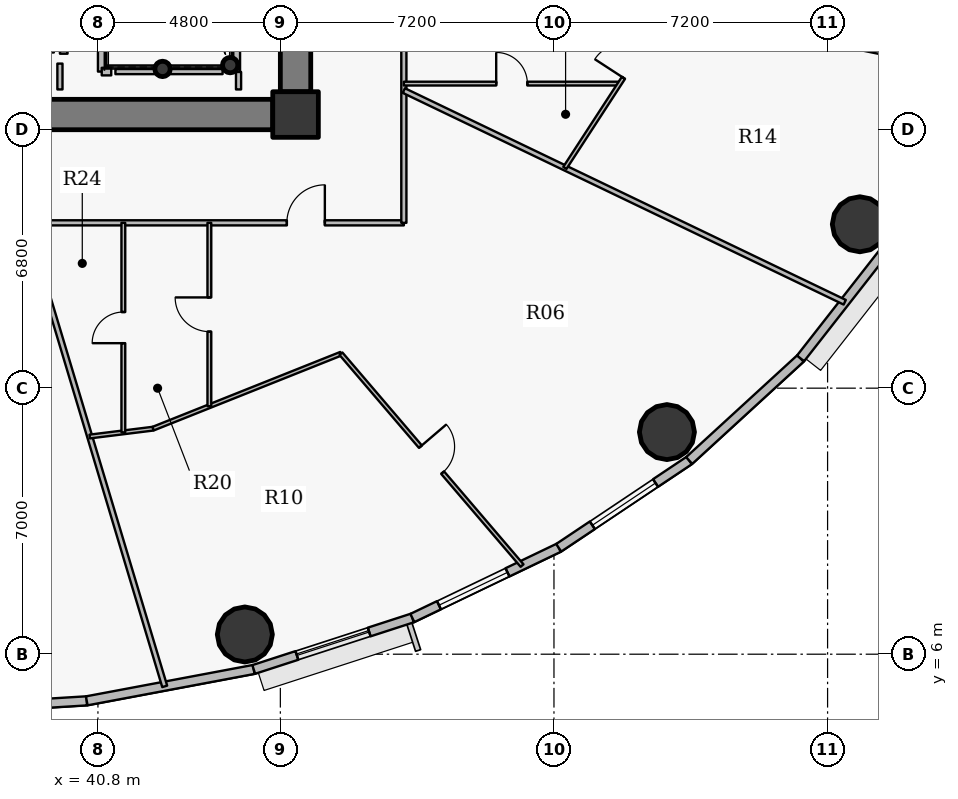
"""IFC4 building model, lengths in metres.
Left out: names, types, materials, properties, quantities, classifications, styles, units other than length and angle.
Written with IfcOpenShell. Run it as: python <this file> out.ifc"""

import sys

from ifc_helpers import new_model, si_unit, direction, frame, frame_2d, origin, origin_2d, place, context, subcontext, project, spatial, rectangle, hollow_circle, extrude, source, transform, mapped, element, fill, save


model = new_model("IFC4")
c1 = context("Model", 3, precision=1e-05, world=origin(), true_north=direction((0.0, 1.0)))
c2 = subcontext(c1, "Body", "Model", "MODEL_VIEW")
j1 = project(units=[si_unit("LENGTHUNIT", "METRE"), si_unit("PLANEANGLEUNIT", "RADIAN")], contexts=[c1])
p1 = place(None, origin())
s1 = spatial("IfcSite", under=j1, at=p1, CompositionType="ELEMENT")
p2 = place(p1, origin())
s2 = spatial("IfcBuilding", under=s1, at=p2, CompositionType="ELEMENT")
p3 = place(p2, frame((0.0, 0.0, 104.7)))
s3 = spatial("IfcBuildingStorey", under=s2, at=p3, CompositionType="ELEMENT", Elevation=104.7)
p4 = place(p3, frame((46.0, 20.2, 0.0), z_axis=(0.0, 0.0, 1.0), x_axis=(1.0, 0.0, 0.0)))
e1 = element("IfcColumn", 1, at=p4, inside=s3, PredefinedType="COLUMN", context=c2, shape_type="SweptSolid", body=[
    extrude(rectangle(XDim=1.2, YDim=1.2, at=origin_2d()), origin(), (0.0, 0.0, 1.0), 3.75),
])
for number, where, z_axis, x_axis in (
    (2, (44.28, 21.5, 0.0), (0.0, 0.0, 1.0), (1.0, 0.0, 0.0)),
    (3, (42.5, 21.4, 0.0), (0.0, 0.0, 1.0), (1.0, 0.0, 0.0)),
):
    element("IfcColumn", number, at=place(p3, frame(where, z_axis=z_axis, x_axis=x_axis)), inside=s3, PredefinedType="COLUMN", context=c2, shape_type="SweptSolid", body=[
        extrude(hollow_circle(Radius=0.203, WallThickness=0.016, at=origin_2d()), origin(), (0.0, 0.0, 1.0), 3.75),
    ])
p5 = place(p3, frame((46.0, 33.2, 0.0), z_axis=(0.0, 0.0, 1.0), x_axis=(0.0, -1.0, 0.0)))
e4 = element("IfcWall", 4, at=p5, inside=s3, PredefinedType="SHEAR", context=c2, shape_type="SweptSolid", body=[
    extrude(rectangle(XDim=12.4, YDim=0.8, at=frame_2d((6.2, 0.0))), origin(), (0.0, 0.0, 1.0), 2.95),
])
p6 = place(p5, frame((5.79, 0.0, 0.0)))
e5 = element("IfcOpeningElement", 5, at=p6, cuts=e4, PredefinedType="OPENING", context=c2, shape_type="SweptSolid", body=[
    extrude(rectangle(XDim=0.82, YDim=2.1, at=origin_2d()), frame((0.41, 0.41, 1.05), z_axis=(0.0, -1.0, 0.0), x_axis=(1.0, 0.0, 0.0)), (0.0, 0.0, 1.0), 0.82),
])
p7 = place(p3, frame((45.4, 20.2, 0.0), z_axis=(0.0, 0.0, 1.0), x_axis=(-1.0, 0.0, 0.0)))
e6 = element("IfcWall", 6, at=p7, inside=s3, PredefinedType="SHEAR", context=c2, shape_type="SweptSolid", body=[
    extrude(rectangle(XDim=18.8, YDim=0.8, at=frame_2d((9.4, 0.0))), origin(), (0.0, 0.0, 1.0), 2.95),
])
p8 = place(p7, frame((10.15, 0.0, 0.0)))
e7 = element("IfcOpeningElement", 7, at=p8, cuts=e6, PredefinedType="OPENING", context=c2, shape_type="SweptSolid", body=[
    extrude(rectangle(XDim=1.15, YDim=2.15, at=origin_2d()), frame((0.575, 0.41, 1.075), z_axis=(0.0, -1.0, 0.0), x_axis=(1.0, 0.0, 0.0)), (0.0, 0.0, 1.0), 0.82),
])
for number, where, z_axis, x_axis in (
    (8, (44.666, 6.519, 0.0), (0.0, 0.0, 1.0), (1.0, 0.0, 0.0)),
    (9, (55.773, 11.844, 0.0), (0.0, 0.0, 1.0), (1.0, 0.0, 0.0)),
    (10, (60.849, 17.312, 0.0), (0.0, 0.0, 1.0), (1.0, 0.0, 0.0)),
):
    element("IfcColumn", number, at=place(p3, frame(where, z_axis=z_axis, x_axis=x_axis)), inside=s3, PredefinedType="COLUMN", context=c2, shape_type="SweptSolid", body=[
        extrude(hollow_circle(Radius=0.725, WallThickness=0.042, at=origin_2d()), origin(), (0.0, 0.0, 1.0), 3.75),
    ])
p9 = place(p3, frame((40.506, 4.773, 0.0), z_axis=(0.0, 0.0, 1.0), x_axis=(-0.998107531589, -0.061492726276, 0.0)))
e11 = element("IfcWall", 11, at=p9, inside=s3, PredefinedType="SOLIDWALL", context=c2, shape_type="SweptSolid", body=[
    extrude(rectangle(XDim=4.514, YDim=0.24, at=frame_2d((2.257, 0.0))), origin(), (0.0, 0.0, 1.0), 3.5),
])
p10 = place(p9, frame((1.257, 0.0, 0.9)))
e12 = element("IfcOpeningElement", 12, at=p10, cuts=e11, PredefinedType="OPENING", context=c2, shape_type="SweptSolid", body=[
    extrude(rectangle(XDim=2.0, YDim=1.75, at=origin_2d()), frame((1.0, 0.13, 0.875), z_axis=(0.0, -1.0, 0.0), x_axis=(1.0, 0.0, 0.0)), (0.0, 0.0, 1.0), 0.26),
])
p11 = place(p3, frame((44.9, 5.599, 0.0), z_axis=(0.0, 0.0, 1.0), x_axis=(-0.982789252177, -0.184730305596, 0.0)))
e13 = element("IfcWall", 13, at=p11, inside=s3, PredefinedType="SOLIDWALL", context=c2, shape_type="SweptSolid", body=[
    extrude(rectangle(XDim=4.471, YDim=0.24, at=frame_2d((2.235, 0.0))), origin(), (0.0, 0.0, 1.0), 3.5),
])
p12 = place(p3, frame((49.074, 6.953, 0.0), z_axis=(0.0, 0.0, 1.0), x_axis=(-0.951211346073, -0.308540070495, 0.0)))
e14 = element("IfcWall", 14, at=p12, inside=s3, PredefinedType="SOLIDWALL", context=c2, shape_type="SweptSolid", body=[
    extrude(rectangle(XDim=4.388, YDim=0.24, at=frame_2d((2.194, 0.0))), origin(), (0.0, 0.0, 1.0), 3.5),
])
p13 = place(p12, frame((1.194, 0.0, 0.9)))
e15 = element("IfcOpeningElement", 15, at=p13, cuts=e14, PredefinedType="OPENING", context=c2, shape_type="SweptSolid", body=[
    extrude(rectangle(XDim=2.0, YDim=1.75, at=origin_2d()), frame((1.0, 0.13, 0.875), z_axis=(0.0, -1.0, 0.0), x_axis=(1.0, 0.0, 0.0)), (0.0, 0.0, 1.0), 0.26),
])
p14 = place(p3, frame((52.925, 8.801, 0.0), z_axis=(0.0, 0.0, 1.0), x_axis=(-0.901589935876, -0.432591709962, 0.0)))
e16 = element("IfcWall", 16, at=p14, inside=s3, PredefinedType="SOLIDWALL", context=c2, shape_type="SweptSolid", body=[
    extrude(rectangle(XDim=4.272, YDim=0.24, at=frame_2d((2.136, 0.0))), origin(), (0.0, 0.0, 1.0), 3.5),
])
p15 = place(p14, frame((1.495, 0.0, 0.9)))
e17 = element("IfcOpeningElement", 17, at=p15, cuts=e16, PredefinedType="OPENING", context=c2, shape_type="SweptSolid", body=[
    extrude(rectangle(XDim=2.0, YDim=1.75, at=origin_2d()), frame((1.0, 0.13, 0.875), z_axis=(0.0, -1.0, 0.0), x_axis=(1.0, 0.0, 0.0)), (0.0, 0.0, 1.0), 0.26),
])
p16 = place(p3, frame((56.358, 11.097, 0.0), z_axis=(0.0, 0.0, 1.0), x_axis=(-0.831221811447, -0.555940914284, 0.0)))
e18 = element("IfcWall", 18, at=p16, inside=s3, PredefinedType="SOLIDWALL", context=c2, shape_type="SweptSolid", body=[
    extrude(rectangle(XDim=4.13, YDim=0.24, at=frame_2d((2.065, 0.0))), origin(), (0.0, 0.0, 1.0), 3.5),
])
p17 = place(p16, frame((1.065, 0.0, 0.9)))
e19 = element("IfcOpeningElement", 19, at=p17, cuts=e18, PredefinedType="OPENING", context=c2, shape_type="SweptSolid", body=[
    extrude(rectangle(XDim=2.0, YDim=1.75, at=origin_2d()), frame((1.0, 0.13, 0.875), z_axis=(0.0, -1.0, 0.0), x_axis=(1.0, 0.0, 0.0)), (0.0, 0.0, 1.0), 0.26),
])
p18 = place(p3, frame((59.289, 13.783, 0.0), z_axis=(0.0, 0.0, 1.0), x_axis=(-0.737113356241, -0.675769117414, 0.0)))
e20 = element("IfcWall", 20, at=p18, inside=s3, PredefinedType="SOLIDWALL", context=c2, shape_type="SweptSolid", body=[
    extrude(rectangle(XDim=3.976, YDim=0.24, at=frame_2d((1.988, 0.0))), origin(), (0.0, 0.0, 1.0), 3.5),
])
p19 = place(p3, frame((61.645, 16.794, 0.0), z_axis=(0.0, 0.0, 1.0), x_axis=(-0.616272103517, -0.787533297345, 0.0)))
e21 = element("IfcWall", 21, at=p19, inside=s3, PredefinedType="SOLIDWALL", context=c2, shape_type="SweptSolid", body=[
    extrude(rectangle(XDim=3.823, YDim=0.24, at=frame_2d((1.912, 0.0))), origin(), (0.0, 0.0, 1.0), 3.5),
])
p20 = place(p3, frame((34.795, 17.35, 0.0), z_axis=(0.0, 0.0, 1.0), x_axis=(1.0, 0.0, 0.0)))
e22 = element("IfcWall", 22, at=p20, inside=s3, PredefinedType="PARTITIONING", context=c2, shape_type="SweptSolid", body=[
    extrude(rectangle(XDim=14.055, YDim=0.135, at=frame_2d((7.028, 0.0))), origin(), (0.0, 0.0, 1.0), 2.935),
])
p21 = place(p20, frame((1.571, 0.0, 0.0)))
e23 = element("IfcOpeningElement", 23, at=p21, cuts=e22, PredefinedType="OPENING", context=c2, shape_type="SweptSolid", body=[
    extrude(rectangle(XDim=1.0, YDim=2.15, at=origin_2d()), frame((0.5, 0.078, 1.075), z_axis=(0.0, -1.0, 0.0), x_axis=(1.0, 0.0, 0.0)), (0.0, 0.0, 1.0), 0.155),
])
p22 = place(p20, frame((10.976, 0.0, 0.0)))
e24 = element("IfcOpeningElement", 24, at=p22, cuts=e22, PredefinedType="OPENING", context=c2, shape_type="SweptSolid", body=[
    extrude(rectangle(XDim=1.0, YDim=2.15, at=origin_2d()), frame((0.5, 0.078, 1.075), z_axis=(0.0, -1.0, 0.0), x_axis=(1.0, 0.0, 0.0)), (0.0, 0.0, 1.0), 0.155),
])
p23 = place(p3, frame((38.896, 17.35, 0.0), z_axis=(0.0, 0.0, 1.0), x_axis=(0.287463970392, -0.957791452105, 0.0)))
e25 = element("IfcWall", 25, at=p23, inside=s3, PredefinedType="PARTITIONING", context=c2, shape_type="SweptSolid", body=[
    extrude(rectangle(XDim=12.734, YDim=0.135, at=frame_2d((6.367, 0.0))), origin(), (0.0, 0.0, 1.0), 2.935),
])
p24 = place(p3, frame((39.8, 21.9, 0.0), z_axis=(0.0, 0.0, 1.0), x_axis=(1.0, 0.0, 0.0)))
e26 = element("IfcWall", 26, at=p24, inside=s3, PredefinedType="PARTITIONING", context=c2, shape_type="SweptSolid", body=[
    extrude(rectangle(XDim=0.2, YDim=0.2, at=frame_2d((0.1, 0.0))), origin(), (0.0, 0.0, 1.0), 3.5),
])
p25 = place(p3, frame((40.584, 11.728, 0.0), z_axis=(0.0, 0.0, 1.0), x_axis=(0.992400317705, 0.123051247123, 0.0)))
e27 = element("IfcWall", 27, at=p25, inside=s3, PredefinedType="PARTITIONING", context=c2, shape_type="SweptSolid", body=[
    extrude(rectangle(XDim=1.68, YDim=0.1, at=frame_2d((0.84, 0.0))), origin(), (0.0, 0.0, 1.0), 2.935),
])
p26 = place(p3, frame((40.9, 21.33, 0.0), z_axis=(0.0, 0.0, 1.0), x_axis=(0.0, 1.0, 0.0)))
e28 = element("IfcWall", 28, at=p26, inside=s3, PredefinedType="PARTITIONING", context=c2, shape_type="SweptSolid", body=[
    extrude(rectangle(XDim=5.91, YDim=0.2, at=frame_2d((2.955, 0.0))), origin(), (0.0, 0.0, 1.0), 3.035),
])
p27 = place(p3, frame((40.9, 21.33, 0.0), z_axis=(0.0, 0.0, 1.0), x_axis=(1.0, 0.0, 0.0)))
e29 = element("IfcWall", 29, at=p27, inside=s3, PredefinedType="PARTITIONING", context=c2, shape_type="SweptSolid", body=[
    extrude(rectangle(XDim=0.25, YDim=0.2, at=frame_2d((0.125, 0.0))), origin(), (0.0, 0.0, 1.0), 3.035),
])
p28 = place(p3, frame((41.469, 11.837, 0.0), z_axis=(0.0, 0.0, 1.0), x_axis=(0.0, 1.0, 0.0)))
e30 = element("IfcWall", 30, at=p28, inside=s3, PredefinedType="PARTITIONING", context=c2, shape_type="SweptSolid", body=[
    extrude(rectangle(XDim=5.513, YDim=0.1, at=frame_2d((2.756, 0.0))), origin(), (0.0, 0.0, 1.0), 2.935),
])
p29 = place(p28, frame((2.346, 0.0, 0.0)))
e31 = element("IfcOpeningElement", 31, at=p29, cuts=e30, PredefinedType="OPENING", context=c2, shape_type="SweptSolid", body=[
    extrude(rectangle(XDim=0.82, YDim=2.1, at=origin_2d()), frame((0.41, 0.06, 1.05), z_axis=(0.0, -1.0, 0.0), x_axis=(1.0, 0.0, 0.0)), (0.0, 0.0, 1.0), 0.12),
])
p30 = place(p3, frame((42.251, 11.934, 0.0), z_axis=(0.0, 0.0, 1.0), x_axis=(0.928805351872, 0.370567967226, 0.0)))
e32 = element("IfcWall", 32, at=p30, inside=s3, PredefinedType="PARTITIONING", context=c2, shape_type="SweptSolid", body=[
    extrude(rectangle(XDim=5.322, YDim=0.1, at=frame_2d((2.661, 0.0))), origin(), (0.0, 0.0, 1.0), 2.935),
])
p31 = place(p3, frame((43.732, 12.525, 0.0), z_axis=(0.0, 0.0, 1.0), x_axis=(0.0, 1.0, 0.0)))
e33 = element("IfcWall", 33, at=p31, inside=s3, PredefinedType="PARTITIONING", context=c2, shape_type="SweptSolid", body=[
    extrude(rectangle(XDim=4.825, YDim=0.1, at=frame_2d((2.413, 0.0))), origin(), (0.0, 0.0, 1.0), 3.5),
])
p32 = place(p31, frame((1.962, 0.0, 0.0)))
e34 = element("IfcOpeningElement", 34, at=p32, cuts=e33, PredefinedType="OPENING", context=c2, shape_type="SweptSolid", body=[
    extrude(rectangle(XDim=0.9, YDim=2.1, at=origin_2d()), frame((0.45, 0.06, 1.05), z_axis=(0.0, -1.0, 0.0), x_axis=(1.0, 0.0, 0.0)), (0.0, 0.0, 1.0), 0.12),
])
p33 = place(p3, frame((44.44, 21.33, 0.0), z_axis=(0.0, 0.0, 1.0), x_axis=(0.0, 1.0, 0.0)))
e35 = element("IfcWall", 35, at=p33, inside=s3, PredefinedType="PARTITIONING", context=c2, shape_type="SweptSolid", body=[
    extrude(rectangle(XDim=8.52, YDim=0.2, at=frame_2d((4.26, 0.0))), origin(), (0.0, 0.0, 1.0), 3.5),
])
p34 = place(p3, frame((47.195, 13.906, 0.0), z_axis=(0.0, 0.0, 1.0), x_axis=(0.649828611722, -0.76008076899, 0.0)))
e36 = element("IfcWall", 36, at=p34, inside=s3, PredefinedType="PARTITIONING", context=c2, shape_type="SweptSolid", body=[
    extrude(rectangle(XDim=7.334, YDim=0.1, at=frame_2d((3.667, 0.0))), origin(), (0.0, 0.0, 1.0), 2.935),
])
p35 = place(p34, frame((3.217, 0.0, 0.0)))
e37 = element("IfcOpeningElement", 37, at=p35, cuts=e36, PredefinedType="OPENING", context=c2, shape_type="SweptSolid", body=[
    extrude(rectangle(XDim=0.9, YDim=2.1, at=origin_2d()), frame((0.45, 0.06, 1.05), z_axis=(0.0, -1.0, 0.0), x_axis=(1.0, 0.0, 0.0)), (0.0, 0.0, 1.0), 0.12),
])
p36 = place(p3, frame((48.85, 17.35, 0.0), z_axis=(0.0, 0.0, 1.0), x_axis=(0.0, 1.0, 0.0)))
e38 = element("IfcWall", 38, at=p36, inside=s3, PredefinedType="PARTITIONING", context=c2, shape_type="SweptSolid", body=[
    extrude(rectangle(XDim=19.3, YDim=0.135, at=frame_2d((9.65, 0.0))), origin(), (0.0, 0.0, 1.0), 2.935),
])
p37 = place(p36, frame((16.551, 0.0, 0.0)))
e39 = element("IfcOpeningElement", 39, at=p37, cuts=e38, PredefinedType="OPENING", context=c2, shape_type="SweptSolid", body=[
    extrude(rectangle(XDim=1.0, YDim=2.15, at=origin_2d()), frame((0.5, 0.078, 1.075), z_axis=(0.0, -1.0, 0.0), x_axis=(1.0, 0.0, 0.0)), (0.0, 0.0, 1.0), 0.155),
])
p38 = place(p36, frame((8.753, 0.0, 0.0)))
e40 = element("IfcOpeningElement", 40, at=p38, cuts=e38, PredefinedType="OPENING", context=c2, shape_type="SweptSolid", body=[
    extrude(rectangle(XDim=1.0, YDim=2.15, at=origin_2d()), frame((0.5, 0.078, 1.075), z_axis=(0.0, -1.0, 0.0), x_axis=(1.0, 0.0, 0.0)), (0.0, 0.0, 1.0), 0.155),
])
p39 = place(p3, frame((48.85, 20.83, 0.0), z_axis=(0.0, 0.0, 1.0), x_axis=(0.901472427533, -0.432836530803, 0.0)))
e41 = element("IfcWall", 41, at=p39, inside=s3, PredefinedType="PARTITIONING", context=c2, shape_type="SweptSolid", body=[
    extrude(rectangle(XDim=12.869, YDim=0.135, at=frame_2d((6.434, 0.0))), origin(), (0.0, 0.0, 1.0), 2.935),
])
p40 = place(p3, frame((48.85, 21.014, 0.0), z_axis=(0.0, 0.0, 1.0), x_axis=(1.0, 0.0, 0.0)))
e42 = element("IfcWall", 42, at=p40, inside=s3, PredefinedType="PARTITIONING", context=c2, shape_type="SweptSolid", body=[
    extrude(rectangle(XDim=5.68, YDim=0.1, at=frame_2d((2.84, 0.0))), origin(), (0.0, 0.0, 1.0), 2.935),
])
p41 = place(p40, frame((2.43, 0.0, 0.0)))
e43 = element("IfcOpeningElement", 43, at=p41, cuts=e42, PredefinedType="OPENING", context=c2, shape_type="SweptSolid", body=[
    extrude(rectangle(XDim=0.82, YDim=2.1, at=origin_2d()), frame((0.41, 0.06, 1.05), z_axis=(0.0, -1.0, 0.0), x_axis=(1.0, 0.0, 0.0)), (0.0, 0.0, 1.0), 0.12),
])
p42 = place(p3, frame((53.087, 18.796, 0.0), z_axis=(0.0, 0.0, 1.0), x_axis=(0.545403476424, 0.838173638278, 0.0)))
e44 = element("IfcWall", 44, at=p42, inside=s3, PredefinedType="PARTITIONING", context=c2, shape_type="SweptSolid", body=[
    extrude(rectangle(XDim=3.948, YDim=0.1, at=frame_2d((1.974, 0.0))), origin(), (0.0, 0.0, 1.0), 2.935),
])
p43 = place(p42, frame((2.827, 0.0, 0.0)))
e45 = element("IfcOpeningElement", 45, at=p43, cuts=e44, PredefinedType="OPENING", context=c2, shape_type="SweptSolid", body=[
    extrude(rectangle(XDim=0.9, YDim=2.1, at=origin_2d()), frame((0.45, 0.06, 1.05), z_axis=(0.0, -1.0, 0.0), x_axis=(1.0, 0.0, 0.0)), (0.0, 0.0, 1.0), 0.12),
])
p44 = place(p3, frame((55.431, 23.05, 0.0), z_axis=(0.0, 0.0, 1.0), x_axis=(0.979953651871, -0.199225601228, 0.0)))
e46 = element("IfcWall", 46, at=p44, inside=s3, PredefinedType="PARTITIONING", context=c2, shape_type="SweptSolid", body=[
    extrude(rectangle(XDim=8.513, YDim=0.1, at=frame_2d((4.257, 0.0))), origin(), (0.0, 0.0, 1.0), 2.935),
])
p45 = place(p3, frame((44.08, 21.33, 0.0), z_axis=(0.0, 0.0, 1.0), x_axis=(-1.0, 0.0, 0.0)))
e47 = element("IfcWall", 47, at=p45, inside=s3, PredefinedType="PARTITIONING", context=c2, shape_type="SweptSolid", body=[
    extrude(rectangle(XDim=2.82, YDim=0.135, at=frame_2d((1.41, 0.0))), origin(), (0.0, 0.0, 1.0), 3.035),
])
p46 = place(p3, frame((39.8, 20.86, 0.0), z_axis=(0.0, 0.0, 1.0), x_axis=(0.0, 1.0, 0.0)))
e48 = element("IfcWall", 48, at=p46, inside=s3, PredefinedType="PARTITIONING", context=c2, shape_type="SweptSolid", body=[
    extrude(rectangle(XDim=0.68, YDim=0.135, at=frame_2d((0.34, 0.0))), origin(), (0.0, 0.0, 1.0), 3.035),
])
p47 = place(p3, frame((44.5, 20.86, 0.0), z_axis=(0.0, 0.0, 1.0), x_axis=(0.0, 1.0, 0.0)))
e49 = element("IfcWall", 49, at=p47, inside=s3, PredefinedType="PARTITIONING", context=c2, shape_type="SweptSolid", body=[
    extrude(rectangle(XDim=0.46, YDim=0.135, at=frame_2d((0.23, 0.0))), origin(), (0.0, 0.0, 1.0), 3.5),
])
p48 = place(p3, frame((45.41, 19.8, 0.0), z_axis=(0.0, 0.0, 1.0), x_axis=(1.0, 0.0, 0.0)))
e50 = element("IfcWall", 50, at=p48, inside=s3, PredefinedType="PARTITIONING", context=c2, shape_type="SweptSolid", body=[
    extrude(rectangle(XDim=0.99, YDim=0.135, at=frame_2d((0.495, 0.0))), origin(), (0.0, 0.0, 1.0), 2.935),
])
p49 = place(p3, frame((46.4, 20.107, 0.0), z_axis=(0.0, 0.0, 1.0), x_axis=(0.0, 1.0, 0.0)))
e51 = element("IfcWall", 51, at=p49, inside=s3, PredefinedType="PARTITIONING", context=c2, shape_type="SweptSolid", body=[
    extrude(rectangle(XDim=0.683, YDim=0.135, at=frame_2d((0.341, 0.0))), origin(), (0.0, 0.0, 1.0), 3.5),
])
m1 = source(origin(), c2, "Body", "SweptSolid", [
    extrude(rectangle(XDim=2.0, YDim=1.75, at=origin_2d()), frame((1.0, 0.03, 0.875), z_axis=(0.0, -1.0, 0.0), x_axis=(1.0, 0.0, 0.0)), (0.0, 0.0, 1.0), 0.06),
])
p50 = place(p13, origin())
e52 = element("IfcWindow", 52, at=p50, inside=s3, PartitioningType="DOUBLE_PANEL_VERTICAL", PredefinedType="WINDOW", context=c2, shape_type="MappedRepresentation", body=[
    mapped(m1, transform((0.0, 0.0, 0.0), x_axis=(1.0, 0.0, 0.0), y_axis=(0.0, 1.0, 0.0), z_axis=(0.0, 0.0, 1.0), scale=1.0)),
])
fill(e15, e52)
p51 = place(p15, origin())
e53 = element("IfcWindow", 53, at=p51, inside=s3, PartitioningType="DOUBLE_PANEL_VERTICAL", PredefinedType="WINDOW", context=c2, shape_type="MappedRepresentation", body=[
    mapped(m1, transform((0.0, 0.0, 0.0), x_axis=(1.0, 0.0, 0.0), y_axis=(0.0, 1.0, 0.0), z_axis=(0.0, 0.0, 1.0), scale=1.0)),
])
fill(e17, e53)
p52 = place(p17, origin())
e54 = element("IfcWindow", 54, at=p52, inside=s3, PartitioningType="DOUBLE_PANEL_VERTICAL", PredefinedType="WINDOW", context=c2, shape_type="MappedRepresentation", body=[
    mapped(m1, transform((0.0, 0.0, 0.0), x_axis=(1.0, 0.0, 0.0), y_axis=(0.0, 1.0, 0.0), z_axis=(0.0, 0.0, 1.0), scale=1.0)),
])
fill(e19, e54)
m2 = source(origin(), c2, "Body", "SweptSolid", [
    extrude(rectangle(XDim=1.0, YDim=2.15, at=origin_2d()), frame((0.5, 0.025, 1.075), z_axis=(0.0, -1.0, 0.0), x_axis=(1.0, 0.0, 0.0)), (0.0, 0.0, 1.0), 0.05),
])
p53 = place(p22, origin())
e55 = element("IfcDoor", 55, at=p53, inside=s3, OperationType="SINGLE_SWING_RIGHT", PredefinedType="DOOR", context=c2, shape_type="MappedRepresentation", body=[
    mapped(m2, transform((0.0, 0.0, 0.0), x_axis=(1.0, 0.0, 0.0), y_axis=(0.0, 1.0, 0.0), z_axis=(0.0, 0.0, 1.0), scale=1.0)),
])
fill(e24, e55)
m3 = source(origin(), c2, "Body", "SweptSolid", [
    extrude(rectangle(XDim=0.9, YDim=2.1, at=origin_2d()), frame((0.45, 0.025, 1.05), z_axis=(0.0, -1.0, 0.0), x_axis=(1.0, 0.0, 0.0)), (0.0, 0.0, 1.0), 0.05),
])
p54 = place(p35, origin())
e56 = element("IfcDoor", 56, at=p54, inside=s3, OperationType="SINGLE_SWING_LEFT", PredefinedType="DOOR", context=c2, shape_type="MappedRepresentation", body=[
    mapped(m3, transform((0.0, 0.0, 0.0), x_axis=(1.0, 0.0, 0.0), y_axis=(0.0, 1.0, 0.0), z_axis=(0.0, 0.0, 1.0), scale=1.0)),
])
fill(e37, e56)
p55 = place(p32, origin())
e57 = element("IfcDoor", 57, at=p55, inside=s3, OperationType="SINGLE_SWING_RIGHT", PredefinedType="DOOR", context=c2, shape_type="MappedRepresentation", body=[
    mapped(m3, transform((0.0, 0.0, 0.0), x_axis=(1.0, 0.0, 0.0), y_axis=(0.0, 1.0, 0.0), z_axis=(0.0, 0.0, 1.0), scale=1.0)),
])
fill(e34, e57)
m4 = source(origin(), c2, "Body", "SweptSolid", [
    extrude(rectangle(XDim=0.82, YDim=2.1, at=origin_2d()), frame((0.41, 0.025, 1.05), z_axis=(0.0, -1.0, 0.0), x_axis=(1.0, 0.0, 0.0)), (0.0, 0.0, 1.0), 0.05),
])
p56 = place(p29, origin())
e58 = element("IfcDoor", 58, at=p56, inside=s3, OperationType="SINGLE_SWING_LEFT", PredefinedType="DOOR", context=c2, shape_type="MappedRepresentation", body=[
    mapped(m4, transform((0.0, 0.0, 0.0), x_axis=(1.0, 0.0, 0.0), y_axis=(0.0, 1.0, 0.0), z_axis=(0.0, 0.0, 1.0), scale=1.0)),
])
fill(e31, e58)
p57 = place(p43, origin())
e59 = element("IfcDoor", 59, at=p57, inside=s3, OperationType="SINGLE_SWING_LEFT", PredefinedType="DOOR", context=c2, shape_type="MappedRepresentation", body=[
    mapped(m3, transform((0.0, 0.0, 0.0), x_axis=(1.0, 0.0, 0.0), y_axis=(0.0, 1.0, 0.0), z_axis=(0.0, 0.0, 1.0), scale=1.0)),
])
fill(e45, e59)
p58 = place(p41, origin())
e60 = element("IfcDoor", 60, at=p58, inside=s3, OperationType="SINGLE_SWING_LEFT", PredefinedType="DOOR", context=c2, shape_type="MappedRepresentation", body=[
    mapped(m4, transform((0.0, 0.0, 0.0), x_axis=(1.0, 0.0, 0.0), y_axis=(0.0, 1.0, 0.0), z_axis=(0.0, 0.0, 1.0), scale=1.0)),
])
fill(e43, e60)
save(model, sys.argv[1])
